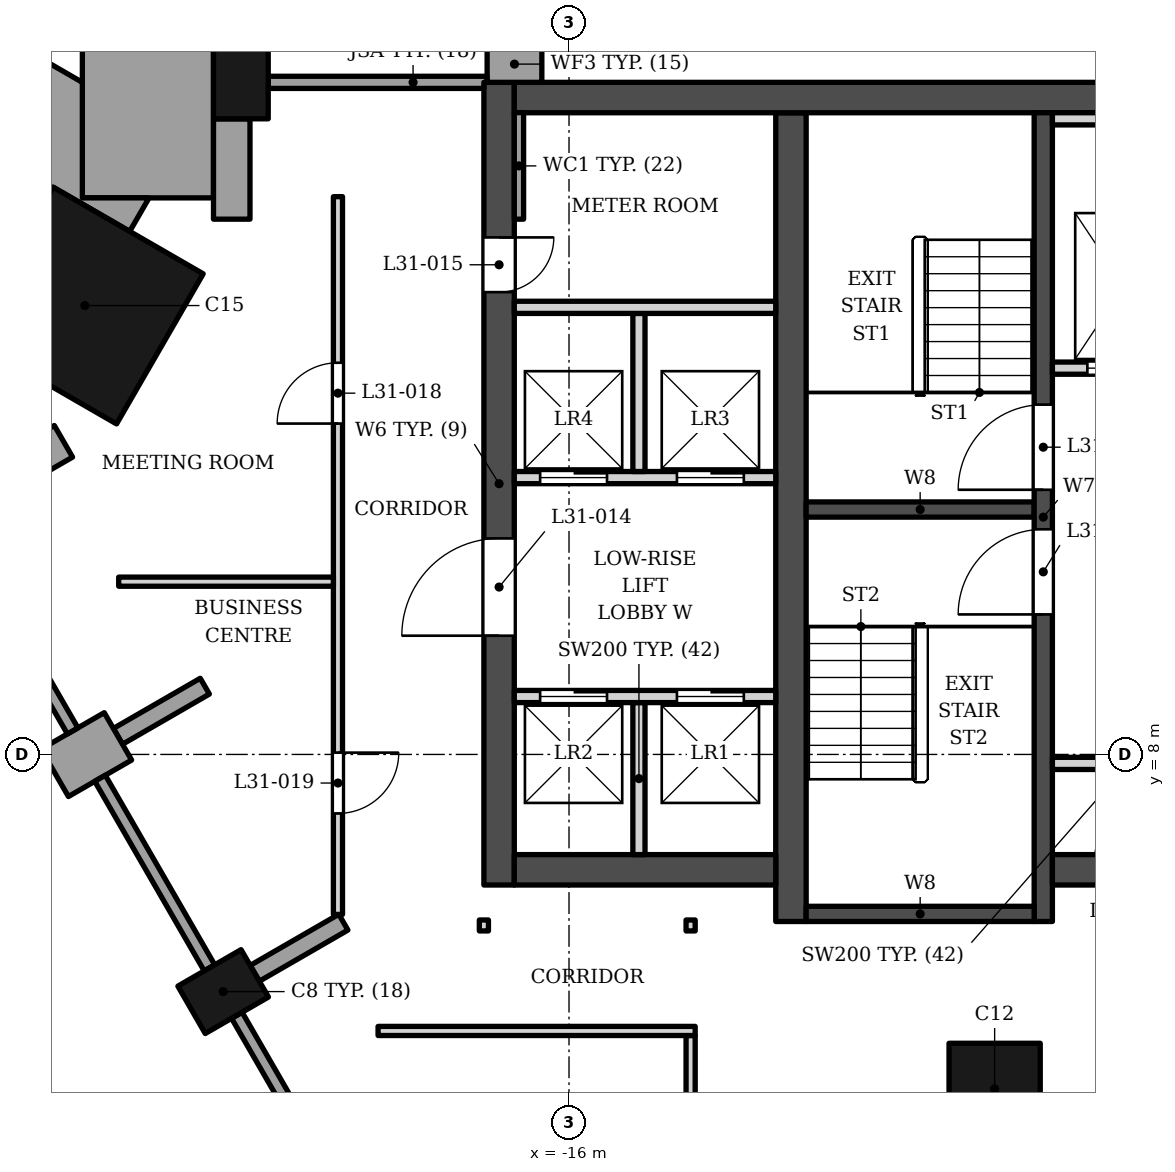
"""IFC4 building model, lengths in metres.
Left out: names, types, materials, properties, quantities, classifications, styles, units other than length and angle.
Written with IfcOpenShell. Run it as: python <this file> out.ifc"""

import sys

from ifc_helpers import new_model, si_unit, direction, frame, frame_2d, origin, origin_2d, place, context, subcontext, project, spatial, polyline, rectangle, outline, extrude, element, fill, save


model = new_model("IFC4")
c1 = context("Model", 3, precision=1e-05, world=origin(), true_north=direction((0.0, 1.0)))
c2 = subcontext(c1, "Body", "Model", "MODEL_VIEW")
j1 = project(units=[si_unit("LENGTHUNIT", "METRE"), si_unit("PLANEANGLEUNIT", "RADIAN")], contexts=[c1])
p1 = place(None, origin())
s1 = spatial("IfcSite", under=j1, at=p1, CompositionType="ELEMENT")
p2 = place(p1, origin())
s2 = spatial("IfcBuilding", under=s1, at=p2, CompositionType="ELEMENT")
p3 = place(p2, frame((0.0, 0.0, 132.6)))
s3 = spatial("IfcBuildingStorey", under=s2, at=p3, CompositionType="ELEMENT", Elevation=132.6)
p4 = place(p3, frame((-16.9, 18.802, 0.0), z_axis=(0.0, 0.0, 1.0), x_axis=(1.0, 0.0, 0.0)))
e1 = element("IfcWall", 1, at=p4, inside=s3, PredefinedType="SHEAR", context=c2, shape_type="SweptSolid", body=[
    extrude(rectangle(XDim=33.8, YDim=0.5, at=frame_2d((16.9, 0.0))), origin(), (0.0, 0.0, 1.0), 7.0),
])
p5 = place(p3, frame((-12.35, 5.253, 0.0), z_axis=(0.0, 0.0, 1.0), x_axis=(0.0, 1.0, 0.0)))
e2 = element("IfcWall", 2, at=p5, inside=s3, PredefinedType="SHEAR", context=c2, shape_type="SweptSolid", body=[
    extrude(rectangle(XDim=13.3, YDim=0.5, at=frame_2d((6.65, 0.0))), origin(), (0.0, 0.0, 1.0), 7.0),
])
p6 = place(p3, frame((-8.2, 5.253, 0.0), z_axis=(0.0, 0.0, 1.0), x_axis=(0.0, 1.0, 0.0)))
e3 = element("IfcWall", 3, at=p6, inside=s3, PredefinedType="SHEAR", context=c2, shape_type="SweptSolid", body=[
    extrude(rectangle(XDim=13.3, YDim=0.3, at=frame_2d((6.65, 0.0))), origin(), (0.0, 0.0, 1.0), 7.0),
])
p7 = place(p6, frame((7.1, 0.0, 0.0)))
e4 = element("IfcOpeningElement", 4, at=p7, cuts=e3, PredefinedType="OPENING", context=c2, shape_type="SweptSolid", body=[
    extrude(rectangle(XDim=1.4, YDim=2.1, at=frame_2d((0.7, 1.05))), frame((0.0, 0.16, 0.0), z_axis=(0.0, -1.0, 0.0), x_axis=(1.0, 0.0, 0.0)), (0.0, 0.0, 1.0), 0.32),
])
p8 = place(p6, frame((5.05, 0.0, 0.0)))
e5 = element("IfcOpeningElement", 5, at=p8, cuts=e3, PredefinedType="OPENING", context=c2, shape_type="SweptSolid", body=[
    extrude(rectangle(XDim=1.4, YDim=2.1, at=frame_2d((0.7, 1.05))), frame((0.0, 0.16, 0.0), z_axis=(0.0, -1.0, 0.0), x_axis=(1.0, 0.0, 0.0)), (0.0, 0.0, 1.0), 0.32),
])
for number, where, z_axis, x_axis in (
    (6, (-12.1, 12.028, 0.0), (0.0, 0.0, 1.0), (1.0, 0.0, 0.0)),
    (7, (-12.1, 5.378, 0.0), (0.0, 0.0, 1.0), (1.0, 0.0, 0.0)),
):
    element("IfcWall", number, at=place(p3, frame(where, z_axis=z_axis, x_axis=x_axis)), inside=s3, PredefinedType="SHEAR", context=c2, shape_type="SweptSolid", body=[
        extrude(rectangle(XDim=3.75, YDim=0.25, at=frame_2d((1.875, 0.0))), origin(), (0.0, 0.0, 1.0), 7.0),
    ])
p9 = place(p3, frame((-8.05, 6.103, 0.0), z_axis=(0.0, 0.0, 1.0), x_axis=(1.0, 0.0, 0.0)))
e8 = element("IfcWall", 8, at=p9, inside=s3, PredefinedType="SHEAR", context=c2, shape_type="SweptSolid", body=[
    extrude(rectangle(XDim=7.05, YDim=0.5, at=frame_2d((3.525, 0.0))), origin(), (0.0, 0.0, 1.0), 7.0),
])
p10 = place(p9, frame((0.825, 0.0, 0.0)))
e9 = element("IfcOpeningElement", 9, at=p10, cuts=e8, PredefinedType="OPENING", context=c2, shape_type="SweptSolid", body=[
    extrude(rectangle(XDim=0.9, YDim=2.1, at=frame_2d((0.45, 1.05))), frame((0.0, 0.26, 0.0), z_axis=(0.0, -1.0, 0.0), x_axis=(1.0, 0.0, 0.0)), (0.0, 0.0, 1.0), 0.52),
])
p11 = place(p3, frame((-12.6, 6.103, 0.0), z_axis=(0.0, 0.0, 1.0), x_axis=(-1.0, 0.0, 0.0)))
e10 = element("IfcWall", 10, at=p11, inside=s3, PredefinedType="SHEAR", context=c2, shape_type="SweptSolid", body=[
    extrude(rectangle(XDim=4.3, YDim=0.5, at=frame_2d((2.15, 0.0))), origin(), (0.0, 0.0, 1.0), 7.0),
])
p12 = place(p3, frame((-17.15, 5.853, 0.0), z_axis=(0.0, 0.0, 1.0), x_axis=(0.0, 1.0, 0.0)))
e11 = element("IfcWall", 11, at=p12, inside=s3, PredefinedType="SHEAR", context=c2, shape_type="SweptSolid", body=[
    extrude(rectangle(XDim=13.2, YDim=0.5, at=frame_2d((6.6, 0.0))), origin(), (0.0, 0.0, 1.0), 7.0),
])
p13 = place(p12, frame((4.1, 0.0, 0.0)))
e12 = element("IfcOpeningElement", 12, at=p13, cuts=e11, PredefinedType="OPENING", context=c2, shape_type="SweptSolid", body=[
    extrude(rectangle(XDim=1.6, YDim=2.1, at=frame_2d((0.8, 1.05))), frame((0.0, 0.26, 0.0), z_axis=(0.0, -1.0, 0.0), x_axis=(1.0, 0.0, 0.0)), (0.0, 0.0, 1.0), 0.52),
])
p14 = place(p12, frame((9.75, 0.0, 0.0)))
e13 = element("IfcOpeningElement", 13, at=p14, cuts=e11, PredefinedType="OPENING", context=c2, shape_type="SweptSolid", body=[
    extrude(rectangle(XDim=0.9, YDim=2.1, at=frame_2d((0.45, 1.05))), frame((0.0, 0.26, 0.0), z_axis=(0.0, -1.0, 0.0), x_axis=(1.0, 0.0, 0.0)), (0.0, 0.0, 1.0), 0.52),
])
p15 = place(p3, frame((-23.963, 15.382, 0.0), z_axis=(0.0, 0.0, 1.0), x_axis=(0.866025403784, -0.5, 0.0)))
e14 = element("IfcColumn", 14, at=p15, inside=s3, PredefinedType="COLUMN", context=c2, shape_type="SweptSolid", body=[
    extrude(rectangle(XDim=2.85, YDim=2.85, at=origin_2d()), origin(), (0.0, 0.0, 1.0), 7.0),
])
p16 = place(p3, frame((-9.0, 2.5, 0.0), z_axis=(0.0, 0.0, 1.0), x_axis=(1.0, 0.0, 0.0)))
e15 = element("IfcColumn", 15, at=p16, inside=s3, PredefinedType="COLUMN", context=c2, shape_type="SweptSolid", body=[
    extrude(rectangle(XDim=1.5, YDim=1.5, at=origin_2d()), origin(), (0.0, 0.0, 1.0), 7.0),
])
for number, where, z_axis, x_axis in (
    (16, (-21.688, 4.1, 0.0), (0.0, 0.0, 1.0), (0.5, -0.866, 0.0)),
    (17, (-21.397, 19.053, 0.0), (0.0, 0.0, 1.0), (-1.0, 0.0, 0.0)),
):
    element("IfcColumn", number, at=place(p3, frame(where, z_axis=z_axis, x_axis=x_axis)), inside=s3, PredefinedType="COLUMN", context=c2, shape_type="SweptSolid", body=[
        extrude(rectangle(XDim=0.9, YDim=1.2, at=origin_2d()), origin(), (0.0, 0.0, 1.0), 7.0),
    ])
p17 = place(p3, frame((-25.744, 12.324, 0.0), z_axis=(0.0, 0.0, 1.0), x_axis=(0.865976140824, 0.500085316245, 0.0)))
e18 = element("IfcWall", 18, at=p17, inside=s3, PredefinedType="SOLIDWALL", context=c2, shape_type="SweptSolid", body=[
    extrude(rectangle(XDim=1.65, YDim=0.6, at=frame_2d((0.825, 0.0))), origin(), (0.0, 0.0, 1.0), 6.0),
])
p18 = place(p3, frame((-24.458, 7.697, 0.0), z_axis=(0.0, 0.0, 1.0), x_axis=(0.865955154139, 0.50012165622, 0.0)))
e19 = element("IfcWall", 19, at=p18, inside=s3, PredefinedType="SOLIDWALL", context=c2, shape_type="SweptSolid", body=[
    extrude(rectangle(XDim=1.2, YDim=0.9, at=frame_2d((0.6, 0.0))), origin(), (0.0, 0.0, 1.0), 6.0),
])
p19 = place(p3, frame((-23.419, 8.297, 0.0), z_axis=(0.0, 0.0, 1.0), x_axis=(0.866040211805, 0.499974350878, 0.0)))
e20 = element("IfcWall", 20, at=p19, inside=s3, PredefinedType="SOLIDWALL", context=c2, shape_type="SweptSolid", body=[
    extrude(rectangle(XDim=1.65, YDim=0.3, at=frame_2d((0.825, 0.0))), origin(), (0.0, 0.0, 1.0), 6.0),
])
p20 = place(p3, frame((-21.168, 4.4, 0.0), z_axis=(0.0, 0.0, 1.0), x_axis=(0.866038204628, 0.499977827634, 0.0)))
e21 = element("IfcWall", 21, at=p20, inside=s3, PredefinedType="SOLIDWALL", context=c2, shape_type="SweptSolid", body=[
    extrude(rectangle(XDim=1.683, YDim=0.3, at=frame_2d((0.841, 0.0))), origin(), (0.0, 0.0, 1.0), 5.92),
])
for number, where, z_axis, x_axis in (
    (22, (-25.963, 11.505, 0.0), (0.0, 0.0, 1.0), (0.5, -0.866, 0.0)),
    (23, (-23.713, 7.608, 0.0), (0.0, 0.0, 1.0), (0.5, -0.866, 0.0)),
    (24, (-21.463, 3.71, 0.0), (0.0, 0.0, 1.0), (0.5, -0.866, 0.0)),
):
    element("IfcWall", number, at=place(p3, frame(where, z_axis=z_axis, x_axis=x_axis)), inside=s3, PredefinedType="SOLIDWALL", context=c2, shape_type="SweptSolid", body=[
        extrude(rectangle(XDim=3.6, YDim=0.2, at=frame_2d((1.8, 0.0))), origin(), (0.0, 0.0, 1.0), 6.0),
    ])
p21 = place(p3, origin())
e25 = element("IfcWall", 25, at=p21, inside=s3, PredefinedType="SOLIDWALL", context=c2, shape_type="SweptSolid", body=[
    extrude(outline(polyline([(-16.447, 19.052), (-16.447, 19.653), (-17.347, 19.653), (-17.347, 19.052), (-16.447, 19.052)])), origin(), (0.0, 0.0, 1.0), 6.0),
])
p22 = place(p3, origin())
e26 = element("IfcWall", 26, at=p22, inside=s3, PredefinedType="SOLIDWALL", context=c2, shape_type="SweptSolid", body=[
    extrude(outline(polyline([(-16.9, 18.555), (-16.747, 18.555), (-16.747, 16.802), (-16.9, 16.802), (-16.9, 18.555)])), origin(), (0.0, 0.0, 1.0), 6.0),
])
p23 = place(p3, origin())
e27 = element("IfcWall", 27, at=p23, inside=s3, PredefinedType="SOLIDWALL", context=c2, shape_type="SweptSolid", body=[
    extrude(outline(polyline([(-21.847, 18.453), (-21.847, 16.802), (-21.247, 16.802), (-21.247, 18.453), (-21.847, 18.453)])), origin(), (0.0, 0.0, 1.0), 6.0),
])
p24 = place(p3, origin())
e28 = element("IfcWall", 28, at=p24, inside=s3, PredefinedType="SOLIDWALL", context=c2, shape_type="SweptSolid", body=[
    extrude(outline(polyline([(-20.947, 19.153), (-20.947, 18.953), (-17.4, 18.953), (-17.4, 19.052), (-17.347, 19.052), (-17.347, 19.153), (-20.947, 19.153)])), origin(), (0.0, 0.0, 1.0), 6.0),
])
p25 = place(p3, origin())
e29 = element("IfcWall", 29, at=p25, inside=s3, PredefinedType="SOLIDWALL", context=c2, shape_type="SweptSolid", body=[
    extrude(outline(polyline([(-24.004, 17.153), (-21.847, 17.153), (-21.847, 18.453), (-21.847, 18.453), (-21.847, 19.653), (-24.004, 19.653), (-24.004, 17.153)])), origin(), (0.0, 0.0, 1.0), 6.0),
])
p26 = place(p3, origin())
e30 = element("IfcWall", 30, at=p26, inside=s3, PredefinedType="SOLIDWALL", context=c2, shape_type="SweptSolid", body=[
    extrude(outline(polyline([(-23.225, 16.601), (-22.907, 17.153), (-24.004, 17.153), (-24.004, 19.052), (-24.523, 19.353), (-27.682, 13.882), (-25.664, 12.717), (-24.65, 14.133), (-25.91, 14.86), (-24.485, 17.329), (-23.225, 16.601)])), origin(), (0.0, 0.0, 1.0), 6.0),
])
for number, where, z_axis, x_axis in (
    (31, (-14.85, 6.353, 0.0), (0.0, 0.0, 1.0), (0.0, 1.0, 0.0)),
    (32, (-8.05, 7.853, 0.0), (0.0, 0.0, 1.0), (1.0, 0.0, 0.0)),
):
    element("IfcWall", number, at=place(p3, frame(where, z_axis=z_axis, x_axis=x_axis)), inside=s3, PredefinedType="SOLIDWALL", context=c2, shape_type="SweptSolid", body=[
        extrude(rectangle(XDim=2.5, YDim=0.2, at=frame_2d((1.25, 0.0))), origin(), (0.0, 0.0, 1.0), 6.7),
    ])
p27 = place(p3, frame((-16.9, 8.953, 0.0), z_axis=(0.0, 0.0, 1.0), x_axis=(1.0, 0.0, 0.0)))
e33 = element("IfcWall", 33, at=p27, inside=s3, PredefinedType="SOLIDWALL", context=c2, shape_type="SweptSolid", body=[
    extrude(rectangle(XDim=4.3, YDim=0.2, at=frame_2d((2.15, 0.0))), origin(), (0.0, 0.0, 1.0), 6.7),
])
p28 = place(p27, frame((2.675, 0.0, 0.0)))
e34 = element("IfcOpeningElement", 34, at=p28, cuts=e33, PredefinedType="OPENING", context=c2, shape_type="SweptSolid", body=[
    extrude(rectangle(XDim=1.1, YDim=2.1, at=frame_2d((0.55, 1.05))), frame((0.0, 0.11, 0.0), z_axis=(0.0, -1.0, 0.0), x_axis=(1.0, 0.0, 0.0)), (0.0, 0.0, 1.0), 0.22),
])
p29 = place(p27, frame((0.425, 0.0, 0.0)))
e35 = element("IfcOpeningElement", 35, at=p29, cuts=e33, PredefinedType="OPENING", context=c2, shape_type="SweptSolid", body=[
    extrude(rectangle(XDim=1.1, YDim=2.1, at=frame_2d((0.55, 1.05))), frame((0.0, 0.11, 0.0), z_axis=(0.0, -1.0, 0.0), x_axis=(1.0, 0.0, 0.0)), (0.0, 0.0, 1.0), 0.22),
])
p30 = place(p3, frame((-16.9, 12.552, 0.0), z_axis=(0.0, 0.0, 1.0), x_axis=(1.0, 0.0, 0.0)))
e36 = element("IfcWall", 36, at=p30, inside=s3, PredefinedType="SOLIDWALL", context=c2, shape_type="SweptSolid", body=[
    extrude(rectangle(XDim=4.3, YDim=0.2, at=frame_2d((2.15, 0.0))), origin(), (0.0, 0.0, 1.0), 6.7),
])
p31 = place(p30, frame((2.675, 0.0, 0.0)))
e37 = element("IfcOpeningElement", 37, at=p31, cuts=e36, PredefinedType="OPENING", context=c2, shape_type="SweptSolid", body=[
    extrude(rectangle(XDim=1.1, YDim=2.1, at=frame_2d((0.55, 1.05))), frame((0.0, 0.11, 0.0), z_axis=(0.0, -1.0, 0.0), x_axis=(1.0, 0.0, 0.0)), (0.0, 0.0, 1.0), 0.22),
])
p32 = place(p30, frame((0.425, 0.0, 0.0)))
e38 = element("IfcOpeningElement", 38, at=p32, cuts=e36, PredefinedType="OPENING", context=c2, shape_type="SweptSolid", body=[
    extrude(rectangle(XDim=1.1, YDim=2.1, at=frame_2d((0.55, 1.05))), frame((0.0, 0.11, 0.0), z_axis=(0.0, -1.0, 0.0), x_axis=(1.0, 0.0, 0.0)), (0.0, 0.0, 1.0), 0.22),
])
p33 = place(p3, frame((-14.85, 12.653, 0.0), z_axis=(0.0, 0.0, 1.0), x_axis=(0.0, 1.0, 0.0)))
e39 = element("IfcWall", 39, at=p33, inside=s3, PredefinedType="SOLIDWALL", context=c2, shape_type="SweptSolid", body=[
    extrude(rectangle(XDim=2.6, YDim=0.2, at=frame_2d((1.3, 0.0))), origin(), (0.0, 0.0, 1.0), 6.7),
])
p34 = place(p3, frame((-8.05, 14.353, 0.0), z_axis=(0.0, 0.0, 1.0), x_axis=(1.0, 0.0, 0.0)))
e40 = element("IfcWall", 40, at=p34, inside=s3, PredefinedType="SOLIDWALL", context=c2, shape_type="SweptSolid", body=[
    extrude(rectangle(XDim=2.35, YDim=0.2, at=frame_2d((1.175, 0.0))), origin(), (0.0, 0.0, 1.0), 6.7),
])
p35 = place(p34, frame((0.575, 0.0, 0.0)))
e41 = element("IfcOpeningElement", 41, at=p35, cuts=e40, PredefinedType="OPENING", context=c2, shape_type="SweptSolid", body=[
    extrude(rectangle(XDim=1.2, YDim=2.1, at=frame_2d((0.6, 1.05))), frame((0.0, 0.11, 0.0), z_axis=(0.0, -1.0, 0.0), x_axis=(1.0, 0.0, 0.0)), (0.0, 0.0, 1.0), 0.22),
])
p36 = place(p3, frame((-16.9, 15.353, 0.0), z_axis=(0.0, 0.0, 1.0), x_axis=(1.0, 0.0, 0.0)))
e42 = element("IfcWall", 42, at=p36, inside=s3, PredefinedType="SOLIDWALL", context=c2, shape_type="SweptSolid", body=[
    extrude(rectangle(XDim=4.3, YDim=0.2, at=frame_2d((2.15, 0.0))), origin(), (0.0, 0.0, 1.0), 6.7),
])
p37 = place(p3, frame((-8.05, 18.453, 0.0), z_axis=(0.0, 0.0, 1.0), x_axis=(1.0, 0.0, 0.0)))
e43 = element("IfcWall", 43, at=p37, inside=s3, PredefinedType="SOLIDWALL", context=c2, shape_type="SweptSolid", body=[
    extrude(rectangle(XDim=2.35, YDim=0.2, at=frame_2d((1.175, 0.0))), origin(), (0.0, 0.0, 1.0), 6.7),
])
p38 = place(p3, frame((-14.0, -5.436, 0.0), z_axis=(0.0, 0.0, 1.0), x_axis=(0.0, 1.0, 0.0)))
e44 = element("IfcWall", 44, at=p38, inside=s3, PredefinedType="PARTITIONING", context=c2, shape_type="SweptSolid", body=[
    extrude(rectangle(XDim=8.814, YDim=0.15, at=frame_2d((4.407, 0.0))), origin(), (0.0, 0.0, 1.0), 6.7),
])
p39 = place(p3, frame((-19.14, 3.453, 0.0), z_axis=(0.0, 0.0, 1.0), x_axis=(1.0, 0.0, 0.0)))
e45 = element("IfcWall", 45, at=p39, inside=s3, PredefinedType="PARTITIONING", context=c2, shape_type="SweptSolid", body=[
    extrude(rectangle(XDim=5.215, YDim=0.15, at=frame_2d((2.608, 0.0))), origin(), (0.0, 0.0, 1.0), 6.302),
])
p40 = place(p3, frame((-19.8, 5.369, 0.0), z_axis=(0.0, 0.0, 1.0), x_axis=(0.0, 1.0, 0.0)))
e46 = element("IfcWall", 46, at=p40, inside=s3, PredefinedType="PARTITIONING", context=c2, shape_type="SweptSolid", body=[
    extrude(rectangle(XDim=11.804, YDim=0.15, at=frame_2d((5.902, 0.0))), origin(), (0.0, 0.0, 1.0), 6.7),
])
p41 = place(p40, frame((8.073, 0.0, 0.0)))
e47 = element("IfcOpeningElement", 47, at=p41, cuts=e46, PredefinedType="OPENING", context=c2, shape_type="SweptSolid", body=[
    extrude(rectangle(XDim=1.0, YDim=2.1, at=frame_2d((0.5, 1.05))), frame((0.0, 0.085, 0.0), z_axis=(0.0, -1.0, 0.0), x_axis=(1.0, 0.0, 0.0)), (0.0, 0.0, 1.0), 0.17),
])
p42 = place(p40, frame((1.661, 0.0, 0.0)))
e48 = element("IfcOpeningElement", 48, at=p42, cuts=e46, PredefinedType="OPENING", context=c2, shape_type="SweptSolid", body=[
    extrude(rectangle(XDim=1.0, YDim=2.1, at=frame_2d((0.5, 1.05))), frame((0.0, 0.085, 0.0), z_axis=(0.0, -1.0, 0.0), x_axis=(1.0, 0.0, 0.0)), (0.0, 0.0, 1.0), 0.17),
])
p43 = place(p3, frame((-17.4, 5.098, 0.0), z_axis=(0.0, 0.0, 1.0), x_axis=(0.0, 1.0, 0.0)))
e49 = element("IfcWall", 49, at=p43, inside=s3, PredefinedType="PARTITIONING", context=c2, shape_type="SweptSolid", body=[
    extrude(rectangle(XDim=0.18, YDim=0.15, at=frame_2d((0.09, 0.0))), origin(), (0.0, 0.0, 1.0), 5.92),
])
p44 = place(p3, frame((-14.0, 5.098, 0.0), z_axis=(0.0, 0.0, 1.0), x_axis=(0.0, 1.0, 0.0)))
e50 = element("IfcWall", 50, at=p44, inside=s3, PredefinedType="PARTITIONING", context=c2, shape_type="SweptSolid", body=[
    extrude(rectangle(XDim=0.18, YDim=0.15, at=frame_2d((0.09, 0.0))), origin(), (0.0, 0.0, 1.0), 6.7),
])
p45 = place(p3, frame((-23.406, 10.841, 0.0), z_axis=(0.0, 0.0, 1.0), x_axis=(1.0, 0.0, 0.0)))
e51 = element("IfcWall", 51, at=p45, inside=s3, PredefinedType="PARTITIONING", context=c2, shape_type="SweptSolid", body=[
    extrude(rectangle(XDim=3.531, YDim=0.15, at=frame_2d((1.766, 0.0))), origin(), (0.0, 0.0, 1.0), 6.172),
])
p46 = place(p35, origin())
e52 = element("IfcDoor", 52, at=p46, inside=s3, OperationType="DOUBLE_DOOR_SLIDING", PredefinedType="DOOR", context=c2, shape_type="SweptSolid", body=[
    extrude(rectangle(XDim=1.2, YDim=2.1, at=frame_2d((0.6, 1.05))), frame((0.0, 0.025, 0.0), z_axis=(0.0, -1.0, 0.0), x_axis=(1.0, 0.0, 0.0)), (0.0, 0.0, 1.0), 0.05),
])
fill(e41, e52)
p47 = place(p28, origin())
e53 = element("IfcDoor", 53, at=p47, inside=s3, OperationType="DOUBLE_DOOR_SLIDING", PredefinedType="DOOR", context=c2, shape_type="SweptSolid", body=[
    extrude(rectangle(XDim=1.1, YDim=2.1, at=frame_2d((0.55, 1.05))), frame((0.0, 0.025, 0.0), z_axis=(0.0, -1.0, 0.0), x_axis=(1.0, 0.0, 0.0)), (0.0, 0.0, 1.0), 0.05),
])
fill(e34, e53)
p48 = place(p31, origin())
e54 = element("IfcDoor", 54, at=p48, inside=s3, OperationType="DOUBLE_DOOR_SLIDING", PredefinedType="DOOR", context=c2, shape_type="SweptSolid", body=[
    extrude(rectangle(XDim=1.1, YDim=2.1, at=frame_2d((0.55, 1.05))), frame((0.0, 0.025, 0.0), z_axis=(0.0, -1.0, 0.0), x_axis=(1.0, 0.0, 0.0)), (0.0, 0.0, 1.0), 0.05),
])
fill(e37, e54)
p49 = place(p29, origin())
e55 = element("IfcDoor", 55, at=p49, inside=s3, OperationType="DOUBLE_DOOR_SLIDING", PredefinedType="DOOR", context=c2, shape_type="SweptSolid", body=[
    extrude(rectangle(XDim=1.1, YDim=2.1, at=frame_2d((0.55, 1.05))), frame((0.0, 0.025, 0.0), z_axis=(0.0, -1.0, 0.0), x_axis=(1.0, 0.0, 0.0)), (0.0, 0.0, 1.0), 0.05),
])
fill(e35, e55)
p50 = place(p32, origin())
e56 = element("IfcDoor", 56, at=p50, inside=s3, OperationType="DOUBLE_DOOR_SLIDING", PredefinedType="DOOR", context=c2, shape_type="SweptSolid", body=[
    extrude(rectangle(XDim=1.1, YDim=2.1, at=frame_2d((0.55, 1.05))), frame((0.0, 0.025, 0.0), z_axis=(0.0, -1.0, 0.0), x_axis=(1.0, 0.0, 0.0)), (0.0, 0.0, 1.0), 0.05),
])
fill(e38, e56)
p51 = place(p7, origin())
e57 = element("IfcDoor", 57, at=p51, inside=s3, OperationType="SINGLE_SWING_LEFT", PredefinedType="DOOR", context=c2, shape_type="SweptSolid", body=[
    extrude(rectangle(XDim=1.4, YDim=2.1, at=frame_2d((0.7, 1.05))), frame((0.0, 0.025, 0.0), z_axis=(0.0, -1.0, 0.0), x_axis=(1.0, 0.0, 0.0)), (0.0, 0.0, 1.0), 0.05),
])
fill(e4, e57)
p52 = place(p8, origin())
e58 = element("IfcDoor", 58, at=p52, inside=s3, OperationType="SINGLE_SWING_LEFT", PredefinedType="DOOR", context=c2, shape_type="SweptSolid", body=[
    extrude(rectangle(XDim=1.4, YDim=2.1, at=frame_2d((0.7, 1.05))), frame((0.0, 0.025, 0.0), z_axis=(0.0, -1.0, 0.0), x_axis=(1.0, 0.0, 0.0)), (0.0, 0.0, 1.0), 0.05),
])
fill(e5, e58)
p53 = place(p13, origin())
e59 = element("IfcDoor", 59, at=p53, inside=s3, OperationType="DOUBLE_DOOR_SINGLE_SWING", PredefinedType="DOOR", context=c2, shape_type="SweptSolid", body=[
    extrude(rectangle(XDim=1.6, YDim=2.1, at=frame_2d((0.8, 1.05))), frame((0.0, 0.025, 0.0), z_axis=(0.0, -1.0, 0.0), x_axis=(1.0, 0.0, 0.0)), (0.0, 0.0, 1.0), 0.05),
])
fill(e12, e59)
p54 = place(p14, origin())
e60 = element("IfcDoor", 60, at=p54, inside=s3, OperationType="SINGLE_SWING_RIGHT", PredefinedType="DOOR", context=c2, shape_type="SweptSolid", body=[
    extrude(rectangle(XDim=0.9, YDim=2.1, at=frame_2d((0.45, 1.05))), frame((0.0, 0.025, 0.0), z_axis=(0.0, -1.0, 0.0), x_axis=(1.0, 0.0, 0.0)), (0.0, 0.0, 1.0), 0.05),
])
fill(e13, e60)
p55 = place(p41, origin())
e61 = element("IfcDoor", 61, at=p55, inside=s3, OperationType="SINGLE_SWING_LEFT", PredefinedType="DOOR", context=c2, shape_type="SweptSolid", body=[
    extrude(rectangle(XDim=1.0, YDim=2.1, at=frame_2d((0.5, 1.05))), frame((0.0, 0.025, 0.0), z_axis=(0.0, -1.0, 0.0), x_axis=(1.0, 0.0, 0.0)), (0.0, 0.0, 1.0), 0.05),
])
fill(e47, e61)
p56 = place(p42, origin())
e62 = element("IfcDoor", 62, at=p56, inside=s3, OperationType="SINGLE_SWING_RIGHT", PredefinedType="DOOR", context=c2, shape_type="SweptSolid", body=[
    extrude(rectangle(XDim=1.0, YDim=2.1, at=frame_2d((0.5, 1.05))), frame((0.0, 0.025, 0.0), z_axis=(0.0, -1.0, 0.0), x_axis=(1.0, 0.0, 0.0)), (0.0, 0.0, 1.0), 0.05),
])
fill(e48, e62)
save(model, sys.argv[1])
